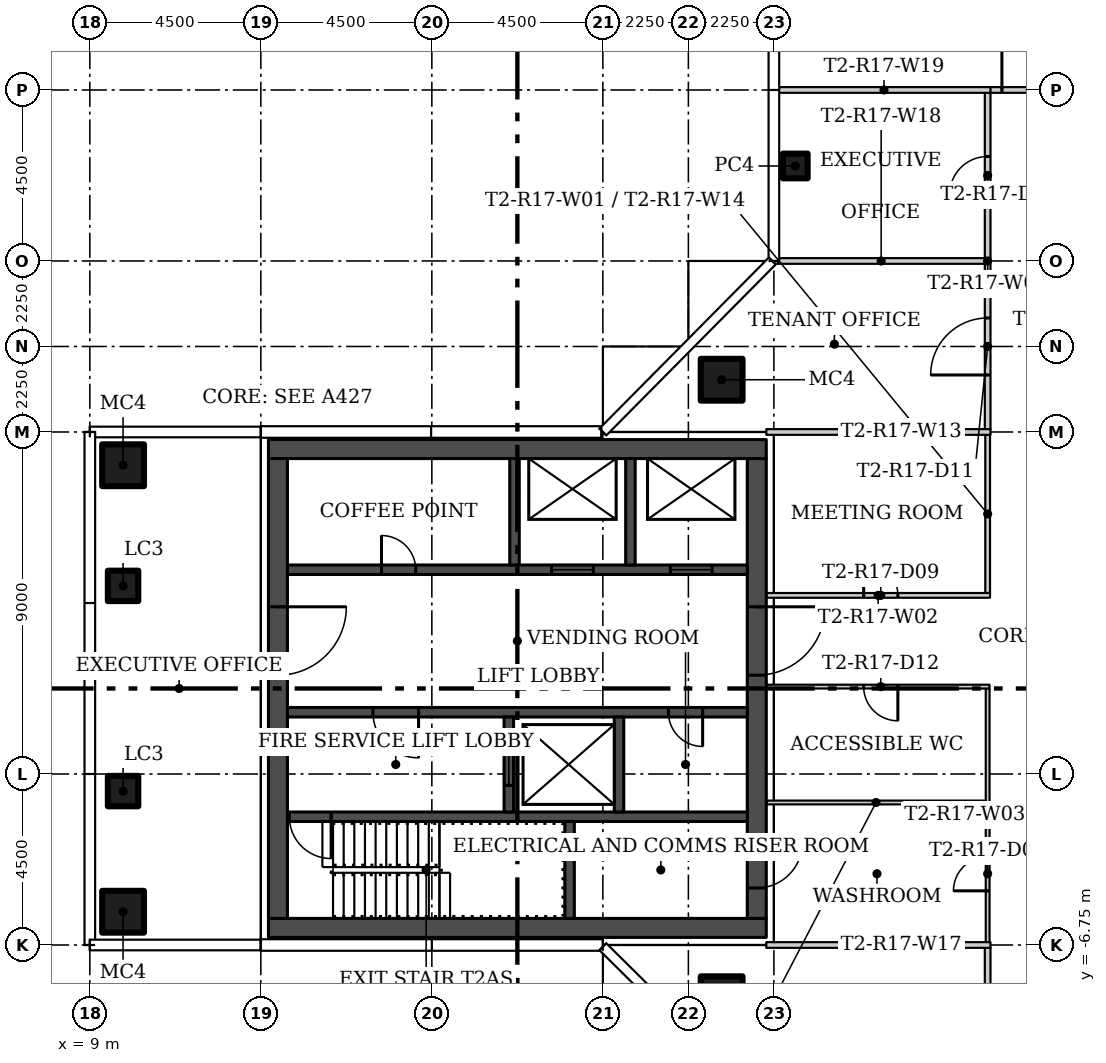
"""IFC4 building model, lengths in metres.
Left out: names, types, materials, properties, quantities, classifications, styles, units other than length and angle.
Written with IfcOpenShell. Run it as: python <this file> out.ifc"""

import sys

from ifc_helpers import new_model, si_unit, direction, frame, frame_2d, origin, origin_2d, place, context, subcontext, project, spatial, rectangle, hollow_rectangle, extrude, element, fill, save


model = new_model("IFC4")
c1 = context("Model", 3, precision=1e-05, world=origin(), true_north=direction((0.0, 1.0)))
c2 = subcontext(c1, "Body", "Model", "MODEL_VIEW")
j1 = project(units=[si_unit("LENGTHUNIT", "METRE"), si_unit("PLANEANGLEUNIT", "RADIAN")], contexts=[c1])
p1 = place(None, origin())
s1 = spatial("IfcSite", under=j1, at=p1, CompositionType="ELEMENT")
p2 = place(p1, origin())
s2 = spatial("IfcBuilding", under=s1, at=p2, CompositionType="ELEMENT")
p3 = place(p2, frame((0.0, 0.0, 150.6)))
s3 = spatial("IfcBuildingStorey", under=s2, at=p3, CompositionType="ELEMENT", Elevation=150.6)
for number, where in (
    (1, (25.625, 8.125, 0.0)),
    (2, (25.625, -8.125, 0.0)),
):
    element("IfcColumn", number, at=place(p3, frame(where)), inside=s3, PredefinedType="COLUMN", context=c2, shape_type="SweptSolid", body=[
        extrude(hollow_rectangle(XDim=1.1, YDim=1.1, WallThickness=0.04, at=origin_2d()), origin(), (0.0, 0.0, 1.0), 3.55),
    ])
p4 = place(p3, frame((27.562, 13.75, 0.0)))
e3 = element("IfcColumn", 3, at=p4, inside=s3, PredefinedType="COLUMN", context=c2, shape_type="SweptSolid", body=[
    extrude(hollow_rectangle(XDim=0.65, YDim=0.65, WallThickness=0.02, at=origin_2d()), origin(), (0.0, 0.0, 1.0), 3.55),
])
for number, where in (
    (4, (9.875, -5.875, 0.0)),
    (5, (9.875, 5.875, 0.0)),
):
    element("IfcColumn", number, at=place(p3, frame(where)), inside=s3, PredefinedType="COLUMN", context=c2, shape_type="SweptSolid", body=[
        extrude(hollow_rectangle(XDim=1.1, YDim=1.1, WallThickness=0.04, at=origin_2d()), origin(), (0.0, 0.0, 1.0), 3.55),
    ])
for number, where in (
    (6, (9.875, -2.7, 0.0)),
    (7, (9.875, 2.7, 0.0)),
):
    element("IfcColumn", number, at=place(p3, frame(where)), inside=s3, PredefinedType="COLUMN", context=c2, shape_type="SweptSolid", body=[
        extrude(hollow_rectangle(XDim=0.8, YDim=0.8, WallThickness=0.03, at=origin_2d()), origin(), (0.0, 0.0, 1.0), 3.55),
    ])
p5 = place(p3, frame((32.625, 2.513, 0.0), z_axis=(0.0, 0.0, 1.0), x_axis=(0.0, 1.0, 0.0)))
e8 = element("IfcWall", 8, at=p5, inside=s3, PredefinedType="PARTITIONING", context=c2, shape_type="SweptSolid", body=[
    extrude(rectangle(XDim=4.162, YDim=0.125, at=frame_2d((2.081, 0.0))), origin(), (0.0, 0.0, 1.0), 3.55),
])
p6 = place(p3, frame((26.8, 2.45, 0.0)))
e9 = element("IfcWall", 9, at=p6, inside=s3, PredefinedType="PARTITIONING", context=c2, shape_type="SweptSolid", body=[
    extrude(rectangle(XDim=5.887, YDim=0.125, at=frame_2d((2.944, 0.0))), origin(), (0.0, 0.0, 1.0), 3.55),
])
p7 = place(p6, frame((2.562, 0.0, 0.0)))
e10 = element("IfcOpeningElement", 10, at=p7, cuts=e9, PredefinedType="OPENING", context=c2, shape_type="SweptSolid", body=[
    extrude(rectangle(XDim=0.9, YDim=2.1, at=frame_2d((0.45, 1.05))), frame((0.0, 0.073, 0.0), z_axis=(0.0, -1.0, 0.0), x_axis=(1.0, 0.0, 0.0)), (0.0, 0.0, 1.0), 0.145),
])
p8 = place(p3, frame((32.625, -6.675, 0.0), z_axis=(0.0, 0.0, 1.0), x_axis=(0.0, 1.0, 0.0)))
e11 = element("IfcWall", 11, at=p8, inside=s3, PredefinedType="PARTITIONING", context=c2, shape_type="SweptSolid", body=[
    extrude(rectangle(XDim=6.675, YDim=0.1, at=frame_2d((3.337, 0.0))), origin(), (0.0, 0.0, 1.0), 3.55),
])
p9 = place(p8, frame((1.35, 0.0, 0.0)))
e12 = element("IfcOpeningElement", 12, at=p9, cuts=e11, PredefinedType="OPENING", context=c2, shape_type="SweptSolid", body=[
    extrude(rectangle(XDim=0.9, YDim=2.1, at=frame_2d((0.45, 1.05))), frame((0.0, 0.06, 0.0), z_axis=(0.0, -1.0, 0.0), x_axis=(1.0, 0.0, 0.0)), (0.0, 0.0, 1.0), 0.12),
])
p10 = place(p3, frame((32.675, 0.05, 0.0), z_axis=(0.0, 0.0, 1.0), x_axis=(-1.0, 0.0, 0.0)))
e13 = element("IfcWall", 13, at=p10, inside=s3, PredefinedType="PARTITIONING", context=c2, shape_type="SweptSolid", body=[
    extrude(rectangle(XDim=5.875, YDim=0.1, at=frame_2d((2.938, 0.0))), origin(), (0.0, 0.0, 1.0), 3.55),
])
p11 = place(p10, frame((2.413, 0.0, 0.0)))
e14 = element("IfcOpeningElement", 14, at=p11, cuts=e13, PredefinedType="OPENING", context=c2, shape_type="SweptSolid", body=[
    extrude(rectangle(XDim=0.9, YDim=2.1, at=frame_2d((0.45, 1.05))), frame((0.0, 0.06, 0.0), z_axis=(0.0, -1.0, 0.0), x_axis=(1.0, 0.0, 0.0)), (0.0, 0.0, 1.0), 0.12),
])
p12 = place(p3, frame((32.625, 6.825, 0.0), z_axis=(0.0, 0.0, 1.0), x_axis=(0.0, 1.0, 0.0)))
e15 = element("IfcWall", 15, at=p12, inside=s3, PredefinedType="PARTITIONING", context=c2, shape_type="SweptSolid", body=[
    extrude(rectangle(XDim=8.85, YDim=0.15, at=frame_2d((4.425, 0.0))), origin(), (0.0, 0.0, 1.0), 3.55),
])
p13 = place(p12, frame((6.175, 0.0, 0.0)))
e16 = element("IfcOpeningElement", 16, at=p13, cuts=e15, PredefinedType="OPENING", context=c2, shape_type="SweptSolid", body=[
    extrude(rectangle(XDim=1.0, YDim=2.4, at=frame_2d((0.5, 1.2))), frame((0.0, 0.085, 0.0), z_axis=(0.0, -1.0, 0.0), x_axis=(1.0, 0.0, 0.0)), (0.0, 0.0, 1.0), 0.17),
])
p14 = place(p12, frame((1.425, 0.0, 0.0)))
e17 = element("IfcOpeningElement", 17, at=p14, cuts=e15, PredefinedType="OPENING", context=c2, shape_type="SweptSolid", body=[
    extrude(rectangle(XDim=1.5, YDim=2.1, at=frame_2d((0.75, 1.05))), frame((0.0, 0.085, 0.0), z_axis=(0.0, -1.0, 0.0), x_axis=(1.0, 0.0, 0.0)), (0.0, 0.0, 1.0), 0.17),
])
p15 = place(p3, frame((32.625, -15.675, 0.0), z_axis=(0.0, 0.0, 1.0), x_axis=(0.0, 1.0, 0.0)))
e18 = element("IfcWall", 18, at=p15, inside=s3, PredefinedType="PARTITIONING", context=c2, shape_type="SweptSolid", body=[
    extrude(rectangle(XDim=8.85, YDim=0.15, at=frame_2d((4.425, 0.0))), origin(), (0.0, 0.0, 1.0), 3.55),
])
p16 = place(p15, frame((3.925, 0.0, 0.0)))
e19 = element("IfcOpeningElement", 19, at=p16, cuts=e18, PredefinedType="OPENING", context=c2, shape_type="SweptSolid", body=[
    extrude(rectangle(XDim=1.0, YDim=2.4, at=frame_2d((0.5, 1.2))), frame((0.0, 0.085, 0.0), z_axis=(0.0, -1.0, 0.0), x_axis=(1.0, 0.0, 0.0)), (0.0, 0.0, 1.0), 0.17),
])
p17 = place(p3, frame((32.55, 15.75, 0.0)))
e20 = element("IfcWall", 20, at=p17, inside=s3, PredefinedType="PARTITIONING", context=c2, shape_type="SweptSolid", body=[
    extrude(rectangle(XDim=2.4, YDim=0.15, at=frame_2d((1.2, 0.0))), origin(), (0.0, 0.0, 1.0), 3.55),
])
p18 = place(p17, frame((0.45, 0.0, 0.0)))
e21 = element("IfcOpeningElement", 21, at=p18, cuts=e20, PredefinedType="OPENING", context=c2, shape_type="SweptSolid", body=[
    extrude(rectangle(XDim=1.5, YDim=2.1, at=frame_2d((0.75, 1.05))), frame((0.0, 0.085, 0.0), z_axis=(0.0, -1.0, 0.0), x_axis=(1.0, 0.0, 0.0)), (0.0, 0.0, 1.0), 0.17),
])
p19 = place(p3, frame((32.7, 6.75, 0.0), z_axis=(0.0, 0.0, 1.0), x_axis=(-1.0, 0.0, 0.0)))
e22 = element("IfcWall", 22, at=p19, inside=s3, PredefinedType="PARTITIONING", context=c2, shape_type="SweptSolid", body=[
    extrude(rectangle(XDim=5.9, YDim=0.15, at=frame_2d((2.95, 0.0))), origin(), (0.0, 0.0, 1.0), 3.55),
])
p20 = place(p3, frame((32.575, -3.0, 0.0), z_axis=(0.0, 0.0, 1.0), x_axis=(-1.0, 0.0, 0.0)))
e23 = element("IfcWall", 23, at=p20, inside=s3, PredefinedType="PARTITIONING", context=c2, shape_type="SweptSolid", body=[
    extrude(rectangle(XDim=5.775, YDim=0.1, at=frame_2d((2.887, 0.0))), origin(), (0.0, 0.0, 1.0), 3.55),
])
p21 = place(p3, frame((26.8, -6.75, 0.0)))
e24 = element("IfcWall", 24, at=p21, inside=s3, PredefinedType="PARTITIONING", context=c2, shape_type="SweptSolid", body=[
    extrude(rectangle(XDim=5.9, YDim=0.15, at=frame_2d((2.95, 0.0))), origin(), (0.0, 0.0, 1.0), 3.55),
])
p22 = place(p3, frame((32.55, 11.25, 0.0), z_axis=(0.0, 0.0, 1.0), x_axis=(-1.0, 0.0, 0.0)))
e25 = element("IfcWall", 25, at=p22, inside=s3, PredefinedType="PARTITIONING", context=c2, shape_type="SweptSolid", body=[
    extrude(rectangle(XDim=5.455, YDim=0.15, at=frame_2d((2.728, 0.0))), origin(), (0.0, 0.0, 1.0), 3.55),
])
p23 = place(p3, frame((32.7, 15.75, 0.0), z_axis=(0.0, 0.0, 1.0), x_axis=(-1.0, 0.0, 0.0)))
e26 = element("IfcWall", 26, at=p23, inside=s3, PredefinedType="PARTITIONING", context=c2, shape_type="SweptSolid", body=[
    extrude(rectangle(XDim=5.605, YDim=0.15, at=frame_2d((2.802, 0.0))), origin(), (0.0, 0.0, 1.0), 3.55),
])
for number, where in (
    (27, (13.7, -6.3, 0.0)),
    (28, (13.7, 6.3, 0.0)),
):
    element("IfcWall", number, at=place(p3, frame(where)), inside=s3, PredefinedType="SHEAR", context=c2, shape_type="SweptSolid", body=[
        extrude(rectangle(XDim=13.1, YDim=0.5, at=frame_2d((6.55, 0.0))), origin(), (0.0, 0.0, 1.0), 3.55),
    ])
p24 = place(p3, frame((13.95, 6.05, 0.0), z_axis=(0.0, 0.0, 1.0), x_axis=(0.0, -1.0, 0.0)))
e29 = element("IfcWall", 29, at=p24, inside=s3, PredefinedType="SHEAR", context=c2, shape_type="SweptSolid", body=[
    extrude(rectangle(XDim=12.1, YDim=0.5, at=frame_2d((6.05, 0.0))), origin(), (0.0, 0.0, 1.0), 3.55),
])
p25 = place(p24, frame((3.9, 0.0, 0.0)))
e30 = element("IfcOpeningElement", 30, at=p25, cuts=e29, PredefinedType="OPENING", context=c2, shape_type="SweptSolid", body=[
    extrude(rectangle(XDim=1.8, YDim=2.4, at=frame_2d((0.9, 1.2))), frame((0.0, 0.26, 0.0), z_axis=(0.0, -1.0, 0.0), x_axis=(1.0, 0.0, 0.0)), (0.0, 0.0, 1.0), 0.52),
])
p26 = place(p3, frame((26.55, 6.05, 0.0), z_axis=(0.0, 0.0, 1.0), x_axis=(0.0, -1.0, 0.0)))
e31 = element("IfcWall", 31, at=p26, inside=s3, PredefinedType="SHEAR", context=c2, shape_type="SweptSolid", body=[
    extrude(rectangle(XDim=12.1, YDim=0.5, at=frame_2d((6.05, 0.0))), origin(), (0.0, 0.0, 1.0), 3.55),
])
p27 = place(p26, frame((10.1, 0.0, 0.0)))
e32 = element("IfcOpeningElement", 32, at=p27, cuts=e31, PredefinedType="OPENING", context=c2, shape_type="SweptSolid", body=[
    extrude(rectangle(XDim=1.2, YDim=2.1, at=frame_2d((0.6, 1.05))), frame((0.0, 0.26, 0.0), z_axis=(0.0, -1.0, 0.0), x_axis=(1.0, 0.0, 0.0)), (0.0, 0.0, 1.0), 0.52),
])
p28 = place(p26, frame((3.9, 0.0, 0.0)))
e33 = element("IfcOpeningElement", 33, at=p28, cuts=e31, PredefinedType="OPENING", context=c2, shape_type="SweptSolid", body=[
    extrude(rectangle(XDim=1.8, YDim=2.4, at=frame_2d((0.9, 1.2))), frame((0.0, 0.26, 0.0), z_axis=(0.0, -1.0, 0.0), x_axis=(1.0, 0.0, 0.0)), (0.0, 0.0, 1.0), 0.52),
])
p29 = place(p3, frame((26.3, -3.375, 0.0), z_axis=(0.0, 0.0, 1.0), x_axis=(-1.0, 0.0, 0.0)))
e34 = element("IfcWall", 34, at=p29, inside=s3, PredefinedType="SHEAR", context=c2, shape_type="SweptSolid", body=[
    extrude(rectangle(XDim=12.1, YDim=0.25, at=frame_2d((6.05, 0.0))), origin(), (0.0, 0.0, 1.0), 3.55),
])
p30 = place(p29, frame((10.95, 0.0, 0.0)))
e35 = element("IfcOpeningElement", 35, at=p30, cuts=e34, PredefinedType="OPENING", context=c2, shape_type="SweptSolid", body=[
    extrude(rectangle(XDim=1.1, YDim=2.1, at=frame_2d((0.55, 1.05))), frame((0.0, 0.135, 0.0), z_axis=(0.0, -1.0, 0.0), x_axis=(1.0, 0.0, 0.0)), (0.0, 0.0, 1.0), 0.27),
])
p31 = place(p3, frame((21.625, -6.05, 0.0), z_axis=(0.0, 0.0, 1.0), x_axis=(0.0, 1.0, 0.0)))
e36 = element("IfcWall", 36, at=p31, inside=s3, PredefinedType="SHEAR", context=c2, shape_type="SweptSolid", body=[
    extrude(rectangle(XDim=2.55, YDim=0.25, at=frame_2d((1.275, 0.0))), origin(), (0.0, 0.0, 1.0), 3.55),
])
p32 = place(p3, frame((26.3, -0.625, 0.0), z_axis=(0.0, 0.0, 1.0), x_axis=(-1.0, 0.0, 0.0)))
e37 = element("IfcWall", 37, at=p32, inside=s3, PredefinedType="SHEAR", context=c2, shape_type="SweptSolid", body=[
    extrude(rectangle(XDim=12.1, YDim=0.25, at=frame_2d((6.05, 0.0))), origin(), (0.0, 0.0, 1.0), 3.55),
])
p33 = place(p32, frame((8.65, 0.0, 0.0)))
e38 = element("IfcOpeningElement", 38, at=p33, cuts=e37, PredefinedType="OPENING", context=c2, shape_type="SweptSolid", body=[
    extrude(rectangle(XDim=1.2, YDim=2.1, at=frame_2d((0.6, 1.05))), frame((0.0, 0.135, 0.0), z_axis=(0.0, -1.0, 0.0), x_axis=(1.0, 0.0, 0.0)), (0.0, 0.0, 1.0), 0.27),
])
p34 = place(p32, frame((1.175, 0.0, 0.0)))
e39 = element("IfcOpeningElement", 39, at=p34, cuts=e37, PredefinedType="OPENING", context=c2, shape_type="SweptSolid", body=[
    extrude(rectangle(XDim=0.9, YDim=2.1, at=frame_2d((0.45, 1.05))), frame((0.0, 0.135, 0.0), z_axis=(0.0, -1.0, 0.0), x_axis=(1.0, 0.0, 0.0)), (0.0, 0.0, 1.0), 0.27),
])
p35 = place(p3, frame((20.025, -3.25, 0.0), z_axis=(0.0, 0.0, 1.0), x_axis=(0.0, 1.0, 0.0)))
e40 = element("IfcWall", 40, at=p35, inside=s3, PredefinedType="SHEAR", context=c2, shape_type="SweptSolid", body=[
    extrude(rectangle(XDim=2.5, YDim=0.25, at=frame_2d((1.25, 0.0))), origin(), (0.0, 0.0, 1.0), 3.55),
])
p36 = place(p35, frame((0.7, 0.0, 0.0)))
e41 = element("IfcOpeningElement", 41, at=p36, cuts=e40, PredefinedType="OPENING", context=c2, shape_type="SweptSolid", body=[
    extrude(rectangle(XDim=1.1, YDim=2.1, at=frame_2d((0.55, 1.05))), frame((0.0, 0.135, 0.0), z_axis=(0.0, -1.0, 0.0), x_axis=(1.0, 0.0, 0.0)), (0.0, 0.0, 1.0), 0.27),
])
p37 = place(p3, frame((22.925, -3.25, 0.0), z_axis=(0.0, 0.0, 1.0), x_axis=(0.0, 1.0, 0.0)))
e42 = element("IfcWall", 42, at=p37, inside=s3, PredefinedType="SHEAR", context=c2, shape_type="SweptSolid", body=[
    extrude(rectangle(XDim=2.5, YDim=0.25, at=frame_2d((1.25, 0.0))), origin(), (0.0, 0.0, 1.0), 3.55),
])
p38 = place(p3, frame((14.2, 3.125, 0.0)))
e43 = element("IfcWall", 43, at=p38, inside=s3, PredefinedType="SHEAR", context=c2, shape_type="SweptSolid", body=[
    extrude(rectangle(XDim=12.1, YDim=0.25, at=frame_2d((6.05, 0.0))), origin(), (0.0, 0.0, 1.0), 3.55),
])
p39 = place(p38, frame((6.95, 0.0, 0.0)))
e44 = element("IfcOpeningElement", 44, at=p39, cuts=e43, PredefinedType="OPENING", context=c2, shape_type="SweptSolid", body=[
    extrude(rectangle(XDim=1.1, YDim=2.1, at=frame_2d((0.55, 1.05))), frame((0.0, 0.135, 0.0), z_axis=(0.0, -1.0, 0.0), x_axis=(1.0, 0.0, 0.0)), (0.0, 0.0, 1.0), 0.27),
])
p40 = place(p38, frame((10.075, 0.0, 0.0)))
e45 = element("IfcOpeningElement", 45, at=p40, cuts=e43, PredefinedType="OPENING", context=c2, shape_type="SweptSolid", body=[
    extrude(rectangle(XDim=1.1, YDim=2.1, at=frame_2d((0.55, 1.05))), frame((0.0, 0.135, 0.0), z_axis=(0.0, -1.0, 0.0), x_axis=(1.0, 0.0, 0.0)), (0.0, 0.0, 1.0), 0.27),
])
p41 = place(p38, frame((2.475, 0.0, 0.0)))
e46 = element("IfcOpeningElement", 46, at=p41, cuts=e43, PredefinedType="OPENING", context=c2, shape_type="SweptSolid", body=[
    extrude(rectangle(XDim=0.9, YDim=2.1, at=frame_2d((0.45, 1.05))), frame((0.0, 0.135, 0.0), z_axis=(0.0, -1.0, 0.0), x_axis=(1.0, 0.0, 0.0)), (0.0, 0.0, 1.0), 0.27),
])
for number, where, z_axis, x_axis in (
    (47, (20.175, 3.25, 0.0), (0.0, 0.0, 1.0), (0.0, 1.0, 0.0)),
    (48, (23.225, 3.25, 0.0), (0.0, 0.0, 1.0), (0.0, 1.0, 0.0)),
):
    element("IfcWall", number, at=place(p3, frame(where, z_axis=z_axis, x_axis=x_axis)), inside=s3, PredefinedType="SHEAR", context=c2, shape_type="SweptSolid", body=[
        extrude(rectangle(XDim=2.8, YDim=0.25, at=frame_2d((1.4, 0.0))), origin(), (0.0, 0.0, 1.0), 3.55),
    ])
p42 = place(p18, origin())
e49 = element("IfcDoor", 49, at=p42, inside=s3, OperationType="DOUBLE_DOOR_SINGLE_SWING", PredefinedType="DOOR", context=c2, shape_type="SweptSolid", body=[
    extrude(rectangle(XDim=1.5, YDim=2.1, at=frame_2d((0.75, 1.05))), frame((0.0, 0.025, 0.0), z_axis=(0.0, -1.0, 0.0), x_axis=(1.0, 0.0, 0.0)), (0.0, 0.0, 1.0), 0.05),
])
fill(e21, e49)
p43 = place(p9, origin())
e50 = element("IfcDoor", 50, at=p43, inside=s3, OperationType="SINGLE_SWING_LEFT", PredefinedType="DOOR", context=c2, shape_type="SweptSolid", body=[
    extrude(rectangle(XDim=0.9, YDim=2.1, at=frame_2d((0.45, 1.05))), frame((0.0, 0.025, 0.0), z_axis=(0.0, -1.0, 0.0), x_axis=(1.0, 0.0, 0.0)), (0.0, 0.0, 1.0), 0.05),
])
fill(e12, e50)
p44 = place(p7, origin())
e51 = element("IfcDoor", 51, at=p44, inside=s3, OperationType="SINGLE_SWING_LEFT", PredefinedType="DOOR", context=c2, shape_type="SweptSolid", body=[
    extrude(rectangle(XDim=0.9, YDim=2.1, at=frame_2d((0.45, 1.05))), frame((0.0, 0.025, 0.0), z_axis=(0.0, -1.0, 0.0), x_axis=(1.0, 0.0, 0.0)), (0.0, 0.0, 1.0), 0.05),
])
fill(e10, e51)
p45 = place(p13, origin())
e52 = element("IfcDoor", 52, at=p45, inside=s3, OperationType="SINGLE_SWING_LEFT", PredefinedType="DOOR", context=c2, shape_type="SweptSolid", body=[
    extrude(rectangle(XDim=1.0, YDim=2.4, at=frame_2d((0.5, 1.2))), frame((0.0, 0.025, 0.0), z_axis=(0.0, -1.0, 0.0), x_axis=(1.0, 0.0, 0.0)), (0.0, 0.0, 1.0), 0.05),
])
fill(e16, e52)
p46 = place(p14, origin())
e53 = element("IfcDoor", 53, at=p46, inside=s3, OperationType="DOUBLE_DOOR_SINGLE_SWING", PredefinedType="DOOR", context=c2, shape_type="SweptSolid", body=[
    extrude(rectangle(XDim=1.5, YDim=2.1, at=frame_2d((0.75, 1.05))), frame((0.0, 0.025, 0.0), z_axis=(0.0, -1.0, 0.0), x_axis=(1.0, 0.0, 0.0)), (0.0, 0.0, 1.0), 0.05),
])
fill(e17, e53)
p47 = place(p11, origin())
e54 = element("IfcDoor", 54, at=p47, inside=s3, OperationType="SINGLE_SWING_RIGHT", PredefinedType="DOOR", context=c2, shape_type="SweptSolid", body=[
    extrude(rectangle(XDim=0.9, YDim=2.1, at=frame_2d((0.45, 1.05))), frame((0.0, 0.025, 0.0), z_axis=(0.0, -1.0, 0.0), x_axis=(1.0, 0.0, 0.0)), (0.0, 0.0, 1.0), 0.05),
])
fill(e14, e54)
p48 = place(p25, origin())
e55 = element("IfcDoor", 55, at=p48, inside=s3, OperationType="DOUBLE_DOOR_SINGLE_SWING", PredefinedType="DOOR", context=c2, shape_type="SweptSolid", body=[
    extrude(rectangle(XDim=1.8, YDim=2.4, at=frame_2d((0.9, 1.2))), frame((0.0, 0.025, 0.0), z_axis=(0.0, -1.0, 0.0), x_axis=(1.0, 0.0, 0.0)), (0.0, 0.0, 1.0), 0.05),
])
fill(e30, e55)
p49 = place(p27, origin())
e56 = element("IfcDoor", 56, at=p49, inside=s3, OperationType="SINGLE_SWING_RIGHT", PredefinedType="DOOR", context=c2, shape_type="SweptSolid", body=[
    extrude(rectangle(XDim=1.2, YDim=2.1, at=frame_2d((0.6, 1.05))), frame((0.0, 0.025, 0.0), z_axis=(0.0, -1.0, 0.0), x_axis=(1.0, 0.0, 0.0)), (0.0, 0.0, 1.0), 0.05),
])
fill(e32, e56)
p50 = place(p28, origin())
e57 = element("IfcDoor", 57, at=p50, inside=s3, OperationType="DOUBLE_DOOR_SINGLE_SWING", PredefinedType="DOOR", context=c2, shape_type="SweptSolid", body=[
    extrude(rectangle(XDim=1.8, YDim=2.4, at=frame_2d((0.9, 1.2))), frame((0.0, 0.025, 0.0), z_axis=(0.0, -1.0, 0.0), x_axis=(1.0, 0.0, 0.0)), (0.0, 0.0, 1.0), 0.05),
])
fill(e33, e57)
p51 = place(p30, origin())
e58 = element("IfcDoor", 58, at=p51, inside=s3, OperationType="SINGLE_SWING_RIGHT", PredefinedType="DOOR", context=c2, shape_type="SweptSolid", body=[
    extrude(rectangle(XDim=1.1, YDim=2.1, at=frame_2d((0.55, 1.05))), frame((0.0, 0.025, 0.0), z_axis=(0.0, -1.0, 0.0), x_axis=(1.0, 0.0, 0.0)), (0.0, 0.0, 1.0), 0.05),
])
fill(e35, e58)
p52 = place(p33, origin())
e59 = element("IfcDoor", 59, at=p52, inside=s3, OperationType="SINGLE_SWING_RIGHT", PredefinedType="DOOR", context=c2, shape_type="SweptSolid", body=[
    extrude(rectangle(XDim=1.2, YDim=2.1, at=frame_2d((0.6, 1.05))), frame((0.0, 0.025, 0.0), z_axis=(0.0, -1.0, 0.0), x_axis=(1.0, 0.0, 0.0)), (0.0, 0.0, 1.0), 0.05),
])
fill(e38, e59)
p53 = place(p34, origin())
e60 = element("IfcDoor", 60, at=p53, inside=s3, OperationType="SINGLE_SWING_LEFT", PredefinedType="DOOR", context=c2, shape_type="SweptSolid", body=[
    extrude(rectangle(XDim=0.9, YDim=2.1, at=frame_2d((0.45, 1.05))), frame((0.0, 0.025, 0.0), z_axis=(0.0, -1.0, 0.0), x_axis=(1.0, 0.0, 0.0)), (0.0, 0.0, 1.0), 0.05),
])
fill(e39, e60)
p54 = place(p36, origin())
e61 = element("IfcDoor", 61, at=p54, inside=s3, OperationType="SLIDING_TO_LEFT", PredefinedType="DOOR", context=c2, shape_type="SweptSolid", body=[
    extrude(rectangle(XDim=1.1, YDim=2.1, at=frame_2d((0.55, 1.05))), frame((0.0, 0.025, 0.0), z_axis=(0.0, -1.0, 0.0), x_axis=(1.0, 0.0, 0.0)), (0.0, 0.0, 1.0), 0.05),
])
fill(e41, e61)
p55 = place(p39, origin())
e62 = element("IfcDoor", 62, at=p55, inside=s3, OperationType="SLIDING_TO_LEFT", PredefinedType="DOOR", context=c2, shape_type="SweptSolid", body=[
    extrude(rectangle(XDim=1.1, YDim=2.1, at=frame_2d((0.55, 1.05))), frame((0.0, 0.025, 0.0), z_axis=(0.0, -1.0, 0.0), x_axis=(1.0, 0.0, 0.0)), (0.0, 0.0, 1.0), 0.05),
])
fill(e44, e62)
p56 = place(p40, origin())
e63 = element("IfcDoor", 63, at=p56, inside=s3, OperationType="SLIDING_TO_LEFT", PredefinedType="DOOR", context=c2, shape_type="SweptSolid", body=[
    extrude(rectangle(XDim=1.1, YDim=2.1, at=frame_2d((0.55, 1.05))), frame((0.0, 0.025, 0.0), z_axis=(0.0, -1.0, 0.0), x_axis=(1.0, 0.0, 0.0)), (0.0, 0.0, 1.0), 0.05),
])
fill(e45, e63)
p57 = place(p41, origin())
e64 = element("IfcDoor", 64, at=p57, inside=s3, OperationType="SINGLE_SWING_LEFT", PredefinedType="DOOR", context=c2, shape_type="SweptSolid", body=[
    extrude(rectangle(XDim=0.9, YDim=2.1, at=frame_2d((0.45, 1.05))), frame((0.0, 0.025, 0.0), z_axis=(0.0, -1.0, 0.0), x_axis=(1.0, 0.0, 0.0)), (0.0, 0.0, 1.0), 0.05),
])
fill(e46, e64)
save(model, sys.argv[1])
